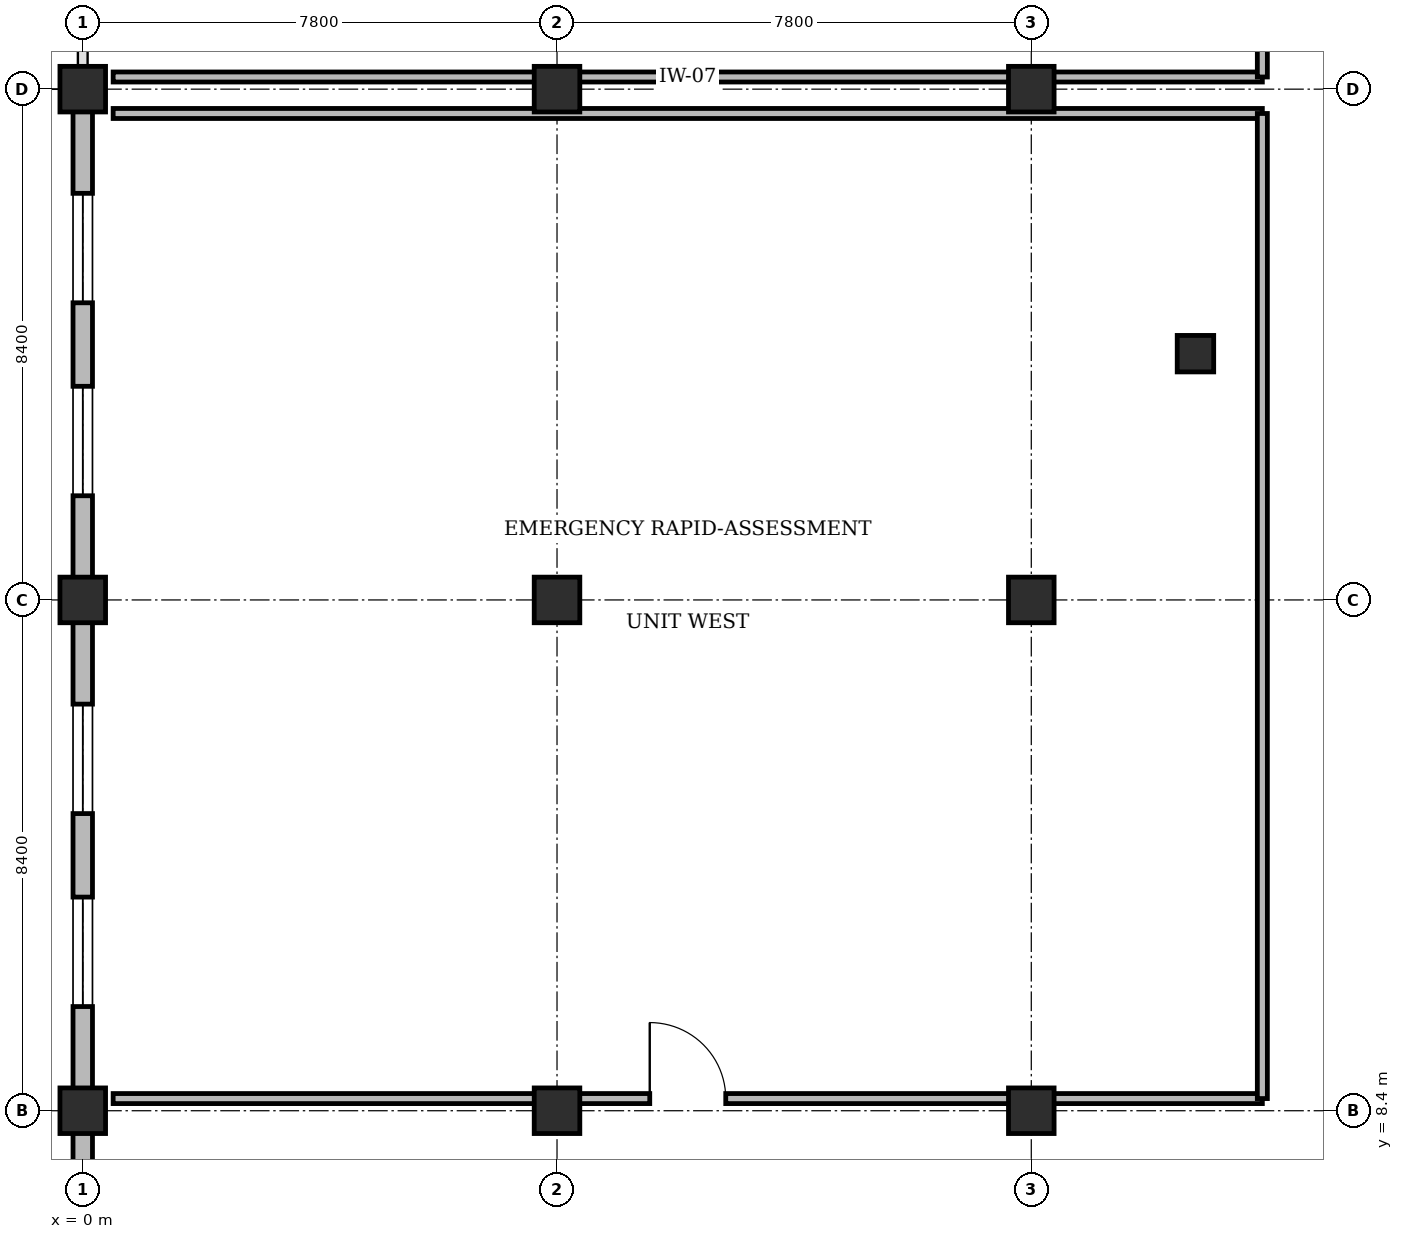
"""IFC4 building model, lengths in metres.
Left out: names, types, materials, properties, quantities, classifications, styles, units other than length and angle.
Written with IfcOpenShell. Run it as: python <this file> out.ifc"""

import sys

from ifc_helpers import new_model, si_unit, direction, frame, frame_2d, origin, origin_2d, place, context, subcontext, project, spatial, rectangle, circle, extrude, element, fill, save


model = new_model("IFC4")
c1 = context("Model", 3, precision=1e-05, world=origin(), true_north=direction((0.0, 1.0)))
c2 = subcontext(c1, "Body", "Model", "MODEL_VIEW")
j1 = project(units=[si_unit("LENGTHUNIT", "METRE"), si_unit("PLANEANGLEUNIT", "RADIAN")], contexts=[c1])
p1 = place(None, origin())
s1 = spatial("IfcSite", under=j1, at=p1, CompositionType="ELEMENT")
p2 = place(p1, origin())
s2 = spatial("IfcBuilding", under=s1, at=p2, CompositionType="ELEMENT")
p3 = place(p2, frame((0.0, 0.0, 4.8)))
s3 = spatial("IfcBuildingStorey", under=s2, at=p3, CompositionType="ELEMENT", Elevation=4.8)
for number, where, z_axis, x_axis in (
    (1, (0.0, 8.4, 0.0), (0.0, 0.0, 1.0), (1.0, 0.0, 0.0)),
    (2, (0.0, 16.8, 0.0), (0.0, 0.0, 1.0), (1.0, 0.0, 0.0)),
    (3, (0.0, 25.2, 0.0), (0.0, 0.0, 1.0), (1.0, 0.0, 0.0)),
    (4, (7.8, 8.4, 0.0), (0.0, 0.0, 1.0), (1.0, 0.0, 0.0)),
    (5, (7.8, 16.8, 0.0), (0.0, 0.0, 1.0), (1.0, 0.0, 0.0)),
    (6, (7.8, 25.2, 0.0), (0.0, 0.0, 1.0), (1.0, 0.0, 0.0)),
    (7, (15.6, 8.4, 0.0), (0.0, 0.0, 1.0), (1.0, 0.0, 0.0)),
    (8, (15.6, 16.8, 0.0), (0.0, 0.0, 1.0), (1.0, 0.0, 0.0)),
    (9, (15.6, 25.2, 0.0), (0.0, 0.0, 1.0), (1.0, 0.0, 0.0)),
):
    element("IfcColumn", number, at=place(p3, frame(where, z_axis=z_axis, x_axis=x_axis)), inside=s3, PredefinedType="COLUMN", context=c2, shape_type="SweptSolid", body=[
        extrude(rectangle(XDim=0.75, YDim=0.75, at=origin_2d()), origin(), (0.0, 0.0, 1.0), 4.8),
    ])
p4 = place(p3, frame((18.3, 20.85, 0.0), z_axis=(0.0, 0.0, 1.0), x_axis=(1.0, 0.0, 0.0)))
e10 = element("IfcColumn", 10, at=p4, inside=s3, PredefinedType="PILASTER", context=c2, shape_type="SweptSolid", body=[
    extrude(circle(Radius=0.3, at=origin_2d()), origin(), (0.0, 0.0, 1.0), 4.8),
])
p5 = place(p3, frame((0.0, 0.34, 0.0), z_axis=(0.0, 0.0, 1.0), x_axis=(0.0, 1.0, 0.0)))
e11 = element("IfcWall", 11, at=p5, inside=s3, PredefinedType="STANDARD", context=c2, shape_type="SweptSolid", body=[
    extrude(rectangle(XDim=7.72, YDim=0.32, at=frame_2d((3.86, 0.0))), origin(), (0.0, 0.0, 1.0), 3.665),
])
p6 = place(p5, frame((1.373, 0.0, 0.9)))
e12 = element("IfcOpeningElement", 12, at=p6, cuts=e11, PredefinedType="OPENING", context=c2, shape_type="SweptSolid", body=[
    extrude(rectangle(XDim=1.8, YDim=1.65, at=frame_2d((0.9, 0.825))), frame((0.0, 0.17, 0.0), z_axis=(0.0, -1.0, 0.0), x_axis=(1.0, 0.0, 0.0)), (0.0, 0.0, 1.0), 0.34),
])
p7 = place(p5, frame((4.547, 0.0, 0.9)))
e13 = element("IfcOpeningElement", 13, at=p7, cuts=e11, PredefinedType="OPENING", context=c2, shape_type="SweptSolid", body=[
    extrude(rectangle(XDim=1.8, YDim=1.65, at=frame_2d((0.9, 0.825))), frame((0.0, 0.17, 0.0), z_axis=(0.0, -1.0, 0.0), x_axis=(1.0, 0.0, 0.0)), (0.0, 0.0, 1.0), 0.34),
])
p8 = place(p3, frame((0.0, 8.74, 0.0), z_axis=(0.0, 0.0, 1.0), x_axis=(0.0, 1.0, 0.0)))
e14 = element("IfcWall", 14, at=p8, inside=s3, PredefinedType="STANDARD", context=c2, shape_type="SweptSolid", body=[
    extrude(rectangle(XDim=7.72, YDim=0.32, at=frame_2d((3.86, 0.0))), origin(), (0.0, 0.0, 1.0), 3.665),
])
p9 = place(p8, frame((1.373, 0.0, 0.9)))
e15 = element("IfcOpeningElement", 15, at=p9, cuts=e14, PredefinedType="OPENING", context=c2, shape_type="SweptSolid", body=[
    extrude(rectangle(XDim=1.8, YDim=1.65, at=frame_2d((0.9, 0.825))), frame((0.0, 0.17, 0.0), z_axis=(0.0, -1.0, 0.0), x_axis=(1.0, 0.0, 0.0)), (0.0, 0.0, 1.0), 0.34),
])
p10 = place(p8, frame((4.547, 0.0, 0.9)))
e16 = element("IfcOpeningElement", 16, at=p10, cuts=e14, PredefinedType="OPENING", context=c2, shape_type="SweptSolid", body=[
    extrude(rectangle(XDim=1.8, YDim=1.65, at=frame_2d((0.9, 0.825))), frame((0.0, 0.17, 0.0), z_axis=(0.0, -1.0, 0.0), x_axis=(1.0, 0.0, 0.0)), (0.0, 0.0, 1.0), 0.34),
])
p11 = place(p3, frame((0.0, 17.14, 0.0), z_axis=(0.0, 0.0, 1.0), x_axis=(0.0, 1.0, 0.0)))
e17 = element("IfcWall", 17, at=p11, inside=s3, PredefinedType="STANDARD", context=c2, shape_type="SweptSolid", body=[
    extrude(rectangle(XDim=7.72, YDim=0.32, at=frame_2d((3.86, 0.0))), origin(), (0.0, 0.0, 1.0), 3.665),
])
p12 = place(p11, frame((1.373, 0.0, 0.9)))
e18 = element("IfcOpeningElement", 18, at=p12, cuts=e17, PredefinedType="OPENING", context=c2, shape_type="SweptSolid", body=[
    extrude(rectangle(XDim=1.8, YDim=1.65, at=frame_2d((0.9, 0.825))), frame((0.0, 0.17, 0.0), z_axis=(0.0, -1.0, 0.0), x_axis=(1.0, 0.0, 0.0)), (0.0, 0.0, 1.0), 0.34),
])
p13 = place(p11, frame((4.547, 0.0, 0.9)))
e19 = element("IfcOpeningElement", 19, at=p13, cuts=e17, PredefinedType="OPENING", context=c2, shape_type="SweptSolid", body=[
    extrude(rectangle(XDim=1.8, YDim=1.65, at=frame_2d((0.9, 0.825))), frame((0.0, 0.17, 0.0), z_axis=(0.0, -1.0, 0.0), x_axis=(1.0, 0.0, 0.0)), (0.0, 0.0, 1.0), 0.34),
])
p14 = place(p3, frame((0.5, 25.4, 0.0), z_axis=(0.0, 0.0, 1.0), x_axis=(1.0, 0.0, 0.0)))
e20 = element("IfcWall", 20, at=p14, inside=s3, PredefinedType="PARTITIONING", context=c2, shape_type="SweptSolid", body=[
    extrude(rectangle(XDim=18.9, YDim=0.165, at=frame_2d((9.45, 0.0))), origin(), (0.0, 0.0, 1.0), 3.68),
])
p15 = place(p3, frame((19.4, 25.4, 0.0), z_axis=(0.0, 0.0, 1.0), x_axis=(0.0, 1.0, 0.0)))
e21 = element("IfcWall", 21, at=p15, inside=s3, PredefinedType="PARTITIONING", context=c2, shape_type="SweptSolid", body=[
    extrude(rectangle(XDim=24.6, YDim=0.165, at=frame_2d((12.3, 0.0))), origin(), (0.0, 0.0, 1.0), 4.46),
])
p16 = place(p15, frame((11.675, 0.0, 0.0)))
e22 = element("IfcOpeningElement", 22, at=p16, cuts=e21, PredefinedType="OPENING", context=c2, shape_type="SweptSolid", body=[
    extrude(rectangle(XDim=1.25, YDim=2.15, at=frame_2d((0.625, 1.075))), frame((0.0, 0.093, 0.0), z_axis=(0.0, -1.0, 0.0), x_axis=(1.0, 0.0, 0.0)), (0.0, 0.0, 1.0), 0.185),
])
p17 = place(p3, frame((0.5, 8.6, 0.0), z_axis=(0.0, 0.0, 1.0), x_axis=(1.0, 0.0, 0.0)))
e23 = element("IfcWall", 23, at=p17, inside=s3, PredefinedType="PARTITIONING", context=c2, shape_type="SweptSolid", body=[
    extrude(rectangle(XDim=18.9, YDim=0.165, at=frame_2d((9.45, 0.0))), origin(), (0.0, 0.0, 1.0), 3.68),
])
p18 = place(p17, frame((8.825, 0.0, 0.0)))
e24 = element("IfcOpeningElement", 24, at=p18, cuts=e23, PredefinedType="OPENING", context=c2, shape_type="SweptSolid", body=[
    extrude(rectangle(XDim=1.25, YDim=2.15, at=frame_2d((0.625, 1.075))), frame((0.0, 0.093, 0.0), z_axis=(0.0, -1.0, 0.0), x_axis=(1.0, 0.0, 0.0)), (0.0, 0.0, 1.0), 0.185),
])
p19 = place(p3, frame((0.5, 24.8, 0.0), z_axis=(0.0, 0.0, 1.0), x_axis=(1.0, 0.0, 0.0)))
e25 = element("IfcWall", 25, at=p19, inside=s3, PredefinedType="PARTITIONING", context=c2, shape_type="SweptSolid", body=[
    extrude(rectangle(XDim=18.9, YDim=0.165, at=frame_2d((9.45, 0.0))), origin(), (0.0, 0.0, 1.0), 3.68),
])
p20 = place(p3, frame((19.4, 8.6, 0.0), z_axis=(0.0, 0.0, 1.0), x_axis=(0.0, 1.0, 0.0)))
e26 = element("IfcWall", 26, at=p20, inside=s3, PredefinedType="PARTITIONING", context=c2, shape_type="SweptSolid", body=[
    extrude(rectangle(XDim=16.2, YDim=0.165, at=frame_2d((8.1, 0.0))), origin(), (0.0, 0.0, 1.0), 4.46),
])
p21 = place(p9, origin())
e27 = element("IfcWindow", 27, at=p21, inside=s3, PartitioningType="SINGLE_PANEL", PredefinedType="WINDOW", context=c2, shape_type="SweptSolid", body=[
    extrude(rectangle(XDim=1.8, YDim=1.65, at=frame_2d((0.9, 0.825))), frame((0.0, 0.03, 0.0), z_axis=(0.0, -1.0, 0.0), x_axis=(1.0, 0.0, 0.0)), (0.0, 0.0, 1.0), 0.06),
])
fill(e15, e27)
p22 = place(p10, origin())
e28 = element("IfcWindow", 28, at=p22, inside=s3, PartitioningType="SINGLE_PANEL", PredefinedType="WINDOW", context=c2, shape_type="SweptSolid", body=[
    extrude(rectangle(XDim=1.8, YDim=1.65, at=frame_2d((0.9, 0.825))), frame((0.0, 0.03, 0.0), z_axis=(0.0, -1.0, 0.0), x_axis=(1.0, 0.0, 0.0)), (0.0, 0.0, 1.0), 0.06),
])
fill(e16, e28)
p23 = place(p12, origin())
e29 = element("IfcWindow", 29, at=p23, inside=s3, PartitioningType="SINGLE_PANEL", PredefinedType="WINDOW", context=c2, shape_type="SweptSolid", body=[
    extrude(rectangle(XDim=1.8, YDim=1.65, at=frame_2d((0.9, 0.825))), frame((0.0, 0.03, 0.0), z_axis=(0.0, -1.0, 0.0), x_axis=(1.0, 0.0, 0.0)), (0.0, 0.0, 1.0), 0.06),
])
fill(e18, e29)
p24 = place(p13, origin())
e30 = element("IfcWindow", 30, at=p24, inside=s3, PartitioningType="SINGLE_PANEL", PredefinedType="WINDOW", context=c2, shape_type="SweptSolid", body=[
    extrude(rectangle(XDim=1.8, YDim=1.65, at=frame_2d((0.9, 0.825))), frame((0.0, 0.03, 0.0), z_axis=(0.0, -1.0, 0.0), x_axis=(1.0, 0.0, 0.0)), (0.0, 0.0, 1.0), 0.06),
])
fill(e19, e30)
p25 = place(p18, origin())
e31 = element("IfcDoor", 31, at=p25, inside=s3, OperationType="SINGLE_SWING_LEFT", PredefinedType="DOOR", context=c2, shape_type="SweptSolid", body=[
    extrude(rectangle(XDim=1.25, YDim=2.15, at=frame_2d((0.625, 1.075))), frame((0.0, 0.025, 0.0), z_axis=(0.0, -1.0, 0.0), x_axis=(1.0, 0.0, 0.0)), (0.0, 0.0, 1.0), 0.05),
])
fill(e24, e31)
save(model, sys.argv[1])
